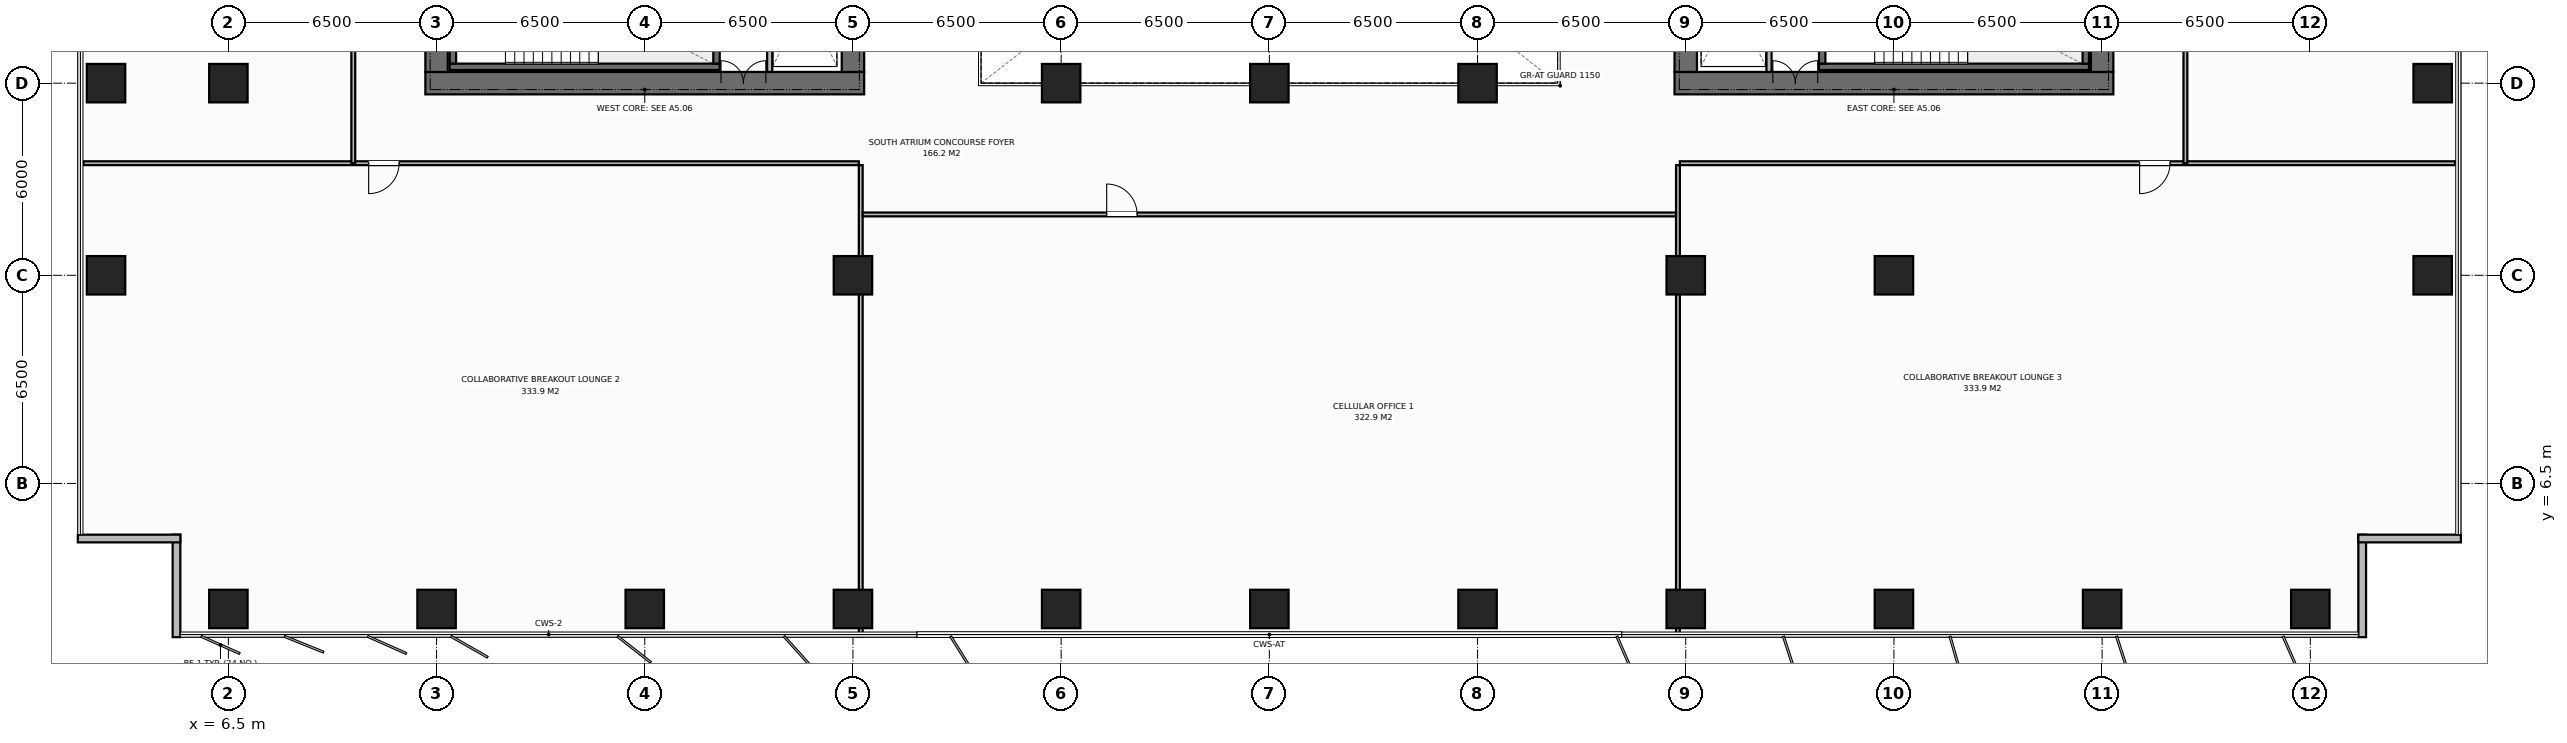
"""IFC4 building model, lengths in metres.
Left out: names, types, materials, properties, quantities, classifications, styles, units other than length and angle.
Written with IfcOpenShell. Run it as: python <this file> out.ifc"""

import sys

from ifc_helpers import new_model, si_unit, direction, frame, frame_2d, origin, origin_2d, place, context, subcontext, project, spatial, rectangle, extrude, element, fill, save


model = new_model("IFC4")
c1 = context("Model", 3, precision=1e-05, world=origin(), true_north=direction((0.0, 1.0)))
c2 = subcontext(c1, "Body", "Model", "MODEL_VIEW")
j1 = project(units=[si_unit("LENGTHUNIT", "METRE"), si_unit("PLANEANGLEUNIT", "RADIAN")], contexts=[c1])
p1 = place(None, origin())
s1 = spatial("IfcSite", under=j1, at=p1, CompositionType="ELEMENT")
p2 = place(p1, origin())
s2 = spatial("IfcBuilding", under=s1, at=p2, CompositionType="ELEMENT")
p3 = place(p2, frame((0.0, 0.0, 89.8)))
s3 = spatial("IfcBuildingStorey", under=s2, at=p3, CompositionType="ELEMENT", Elevation=89.8)
p4 = place(p3, frame((12.65, 19.0, 0.0), z_axis=(0.0, 0.0, 1.0), x_axis=(1.0, 0.0, 0.0)))
e1 = element("IfcWall", 1, at=p4, inside=s3, PredefinedType="SHEAR", context=c2, shape_type="SweptSolid", body=[
    extrude(rectangle(XDim=13.7, YDim=0.7, at=frame_2d((6.85, 0.0))), origin(), (0.0, 0.0, 1.0), 3.8),
])
p5 = place(p4, frame((9.23, 0.0, 0.0)))
e2 = element("IfcOpeningElement", 2, at=p5, cuts=e1, PredefinedType="OPENING", context=c2, shape_type="SweptSolid", body=[
    extrude(rectangle(XDim=1.4, YDim=2.2, at=frame_2d((0.7, 1.1))), frame((0.0, 0.36, 0.0), z_axis=(0.0, -1.0, 0.0), x_axis=(1.0, 0.0, 0.0)), (0.0, 0.0, 1.0), 0.72),
])
p6 = place(p3, frame((13.0, 19.35, 0.0), z_axis=(0.0, 0.0, 1.0), x_axis=(0.0, 1.0, 0.0)))
e3 = element("IfcWall", 3, at=p6, inside=s3, PredefinedType="SHEAR", context=c2, shape_type="SweptSolid", body=[
    extrude(rectangle(XDim=13.3, YDim=0.7, at=frame_2d((6.65, 0.0))), origin(), (0.0, 0.0, 1.0), 3.8),
])
p7 = place(p6, frame((4.7, 0.0, 0.0)))
e4 = element("IfcOpeningElement", 4, at=p7, cuts=e3, PredefinedType="OPENING", context=c2, shape_type="SweptSolid", body=[
    extrude(rectangle(XDim=1.4, YDim=2.2, at=frame_2d((0.7, 1.1))), frame((0.0, 0.36, 0.0), z_axis=(0.0, -1.0, 0.0), x_axis=(1.0, 0.0, 0.0)), (0.0, 0.0, 1.0), 0.72),
])
p8 = place(p3, frame((26.0, 19.35, 0.0), z_axis=(0.0, 0.0, 1.0), x_axis=(0.0, 1.0, 0.0)))
e5 = element("IfcWall", 5, at=p8, inside=s3, PredefinedType="SHEAR", context=c2, shape_type="SweptSolid", body=[
    extrude(rectangle(XDim=13.3, YDim=0.7, at=frame_2d((6.65, 0.0))), origin(), (0.0, 0.0, 1.0), 3.8),
])
p9 = place(p3, frame((51.65, 19.0, 0.0), z_axis=(0.0, 0.0, 1.0), x_axis=(1.0, 0.0, 0.0)))
e6 = element("IfcWall", 6, at=p9, inside=s3, PredefinedType="SHEAR", context=c2, shape_type="SweptSolid", body=[
    extrude(rectangle(XDim=13.7, YDim=0.7, at=frame_2d((6.85, 0.0))), origin(), (0.0, 0.0, 1.0), 3.8),
])
p10 = place(p9, frame((3.07, 0.0, 0.0)))
e7 = element("IfcOpeningElement", 7, at=p10, cuts=e6, PredefinedType="OPENING", context=c2, shape_type="SweptSolid", body=[
    extrude(rectangle(XDim=1.4, YDim=2.2, at=frame_2d((0.7, 1.1))), frame((0.0, 0.36, 0.0), z_axis=(0.0, -1.0, 0.0), x_axis=(1.0, 0.0, 0.0)), (0.0, 0.0, 1.0), 0.72),
])
p11 = place(p3, frame((52.0, 19.35, 0.0), z_axis=(0.0, 0.0, 1.0), x_axis=(0.0, 1.0, 0.0)))
e8 = element("IfcWall", 8, at=p11, inside=s3, PredefinedType="SHEAR", context=c2, shape_type="SweptSolid", body=[
    extrude(rectangle(XDim=13.3, YDim=0.7, at=frame_2d((6.65, 0.0))), origin(), (0.0, 0.0, 1.0), 3.8),
])
p12 = place(p3, frame((65.0, 19.35, 0.0), z_axis=(0.0, 0.0, 1.0), x_axis=(0.0, 1.0, 0.0)))
e9 = element("IfcWall", 9, at=p12, inside=s3, PredefinedType="SHEAR", context=c2, shape_type="SweptSolid", body=[
    extrude(rectangle(XDim=13.3, YDim=0.7, at=frame_2d((6.65, 0.0))), origin(), (0.0, 0.0, 1.0), 3.8),
])
p13 = place(p12, frame((8.1, 0.0, 0.0)))
e10 = element("IfcOpeningElement", 10, at=p13, cuts=e9, PredefinedType="OPENING", context=c2, shape_type="SweptSolid", body=[
    extrude(rectangle(XDim=1.3, YDim=2.2, at=frame_2d((0.65, 1.1))), frame((0.0, 0.36, 0.0), z_axis=(0.0, -1.0, 0.0), x_axis=(1.0, 0.0, 0.0)), (0.0, 0.0, 1.0), 0.72),
])
p14 = place(p3, frame((13.41, 19.51, 0.0), z_axis=(0.0, 0.0, 1.0), x_axis=(1.0, 0.0, 0.0)))
e11 = element("IfcWall", 11, at=p14, inside=s3, PredefinedType="SHEAR", context=c2, shape_type="SweptSolid", body=[
    extrude(rectangle(XDim=8.43, YDim=0.2, at=frame_2d((4.215, 0.0))), origin(), (0.0, 0.0, 1.0), 3.8),
])
for number, where, z_axis, x_axis in (
    (12, (13.51, 19.61, 0.0), (0.0, 0.0, 1.0), (0.0, 1.0, 0.0)),
    (13, (21.74, 19.61, 0.0), (0.0, 0.0, 1.0), (0.0, 1.0, 0.0)),
):
    element("IfcWall", number, at=place(p3, frame(where, z_axis=z_axis, x_axis=x_axis)), inside=s3, PredefinedType="SHEAR", context=c2, shape_type="SweptSolid", body=[
        extrude(rectangle(XDim=3.28, YDim=0.2, at=frame_2d((1.64, 0.0))), origin(), (0.0, 0.0, 1.0), 3.8),
    ])
p15 = place(p3, frame((56.16, 19.51, 0.0), z_axis=(0.0, 0.0, 1.0), x_axis=(1.0, 0.0, 0.0)))
e14 = element("IfcWall", 14, at=p15, inside=s3, PredefinedType="SHEAR", context=c2, shape_type="SweptSolid", body=[
    extrude(rectangle(XDim=8.43, YDim=0.2, at=frame_2d((4.215, 0.0))), origin(), (0.0, 0.0, 1.0), 3.8),
])
for number, where, z_axis, x_axis in (
    (15, (56.26, 19.61, 0.0), (0.0, 0.0, 1.0), (0.0, 1.0, 0.0)),
    (16, (64.49, 19.61, 0.0), (0.0, 0.0, 1.0), (0.0, 1.0, 0.0)),
):
    element("IfcWall", number, at=place(p3, frame(where, z_axis=z_axis, x_axis=x_axis)), inside=s3, PredefinedType="SHEAR", context=c2, shape_type="SweptSolid", body=[
        extrude(rectangle(XDim=3.28, YDim=0.2, at=frame_2d((1.64, 0.0))), origin(), (0.0, 0.0, 1.0), 3.8),
    ])
for number, where, z_axis, x_axis in (
    (17, (58.5, 13.0, 0.0), (0.0, 0.0, 1.0), (1.0, 0.0, 0.0)),
    (18, (6.5, 19.0, 0.0), (0.0, 0.0, 1.0), (1.0, 0.0, 0.0)),
    (19, (32.5, 19.0, 0.0), (0.0, 0.0, 1.0), (1.0, 0.0, 0.0)),
    (20, (39.0, 19.0, 0.0), (0.0, 0.0, 1.0), (1.0, 0.0, 0.0)),
    (21, (45.5, 19.0, 0.0), (0.0, 0.0, 1.0), (1.0, 0.0, 0.0)),
    (22, (26.0, 13.0, 0.0), (0.0, 0.0, 1.0), (1.0, 0.0, 0.0)),
    (23, (52.0, 13.0, 0.0), (0.0, 0.0, 1.0), (1.0, 0.0, 0.0)),
    (24, (6.5, 2.58, 0.0), (0.0, 0.0, 1.0), (1.0, 0.0, 0.0)),
    (25, (13.0, 2.58, 0.0), (0.0, 0.0, 1.0), (1.0, 0.0, 0.0)),
    (26, (19.5, 2.58, 0.0), (0.0, 0.0, 1.0), (1.0, 0.0, 0.0)),
    (27, (26.0, 2.58, 0.0), (0.0, 0.0, 1.0), (1.0, 0.0, 0.0)),
    (28, (32.5, 2.58, 0.0), (0.0, 0.0, 1.0), (1.0, 0.0, 0.0)),
    (29, (39.0, 2.58, 0.0), (0.0, 0.0, 1.0), (1.0, 0.0, 0.0)),
    (30, (45.5, 2.58, 0.0), (0.0, 0.0, 1.0), (1.0, 0.0, 0.0)),
    (31, (52.0, 2.58, 0.0), (0.0, 0.0, 1.0), (1.0, 0.0, 0.0)),
    (32, (58.5, 2.58, 0.0), (0.0, 0.0, 1.0), (1.0, 0.0, 0.0)),
    (33, (65.0, 2.58, 0.0), (0.0, 0.0, 1.0), (1.0, 0.0, 0.0)),
    (34, (71.5, 2.58, 0.0), (0.0, 0.0, 1.0), (1.0, 0.0, 0.0)),
    (35, (2.68, 13.0, 0.0), (0.0, 0.0, 1.0), (1.0, 0.0, 0.0)),
    (36, (75.32, 13.0, 0.0), (0.0, 0.0, 1.0), (1.0, 0.0, 0.0)),
    (37, (2.68, 19.0, 0.0), (0.0, 0.0, 1.0), (1.0, 0.0, 0.0)),
    (38, (75.32, 19.0, 0.0), (0.0, 0.0, 1.0), (1.0, 0.0, 0.0)),
):
    element("IfcColumn", number, at=place(p3, frame(where, z_axis=z_axis, x_axis=x_axis)), inside=s3, PredefinedType="COLUMN", context=c2, shape_type="SweptSolid", body=[
        extrude(rectangle(XDim=1.2, YDim=1.2, at=origin_2d()), origin(), (0.0, 0.0, 1.0), 3.8),
    ])
for number, where, z_axis, x_axis in (
    (39, (4.88, 1.7, 0.0), (0.0, 0.0, 1.0), (0.0, 1.0, 0.0)),
    (40, (5.0, 4.78, 0.0), (0.0, 0.0, 1.0), (-1.0, 0.0, 0.0)),
    (41, (73.12, 4.9, 0.0), (0.0, 0.0, 1.0), (0.0, -1.0, 0.0)),
    (42, (76.2, 4.78, 0.0), (0.0, 0.0, 1.0), (-1.0, 0.0, 0.0)),
):
    element("IfcWall", number, at=place(p3, frame(where, z_axis=z_axis, x_axis=x_axis)), inside=s3, PredefinedType="STANDARD", context=c2, shape_type="SweptSolid", body=[
        extrude(rectangle(XDim=3.2, YDim=0.24, at=frame_2d((1.6, 0.0))), origin(), (0.0, 0.0, 1.0), 3.565),
    ])
p16 = place(p3, frame((23.4, 19.35, 0.0), z_axis=(0.0, 0.0, 1.0), x_axis=(0.0, 1.0, 0.0)))
e43 = element("IfcWall", 43, at=p16, inside=s3, PredefinedType="STANDARD", context=c2, shape_type="SweptSolid", body=[
    extrude(rectangle(XDim=13.3, YDim=0.16, at=frame_2d((6.65, 0.0))), origin(), (0.0, 0.0, 1.0), 3.565),
])
p17 = place(p16, frame((4.95, 0.0, 0.0)))
e44 = element("IfcOpeningElement", 44, at=p17, cuts=e43, PredefinedType="OPENING", context=c2, shape_type="SweptSolid", body=[
    extrude(rectangle(XDim=1.1, YDim=2.2, at=frame_2d((0.55, 1.1))), frame((0.0, 0.09, 0.0), z_axis=(0.0, -1.0, 0.0), x_axis=(1.0, 0.0, 0.0)), (0.0, 0.0, 1.0), 0.18),
])
p18 = place(p16, frame((7.1, 0.0, 0.0)))
e45 = element("IfcOpeningElement", 45, at=p18, cuts=e43, PredefinedType="OPENING", context=c2, shape_type="SweptSolid", body=[
    extrude(rectangle(XDim=1.1, YDim=2.2, at=frame_2d((0.55, 1.1))), frame((0.0, 0.09, 0.0), z_axis=(0.0, -1.0, 0.0), x_axis=(1.0, 0.0, 0.0)), (0.0, 0.0, 1.0), 0.18),
])
p19 = place(p3, frame((54.6, 19.35, 0.0), z_axis=(0.0, 0.0, 1.0), x_axis=(0.0, 1.0, 0.0)))
e46 = element("IfcWall", 46, at=p19, inside=s3, PredefinedType="STANDARD", context=c2, shape_type="SweptSolid", body=[
    extrude(rectangle(XDim=13.3, YDim=0.16, at=frame_2d((6.65, 0.0))), origin(), (0.0, 0.0, 1.0), 3.565),
])
p20 = place(p19, frame((4.95, 0.0, 0.0)))
e47 = element("IfcOpeningElement", 47, at=p20, cuts=e46, PredefinedType="OPENING", context=c2, shape_type="SweptSolid", body=[
    extrude(rectangle(XDim=1.1, YDim=2.2, at=frame_2d((0.55, 1.1))), frame((0.0, 0.09, 0.0), z_axis=(0.0, -1.0, 0.0), x_axis=(1.0, 0.0, 0.0)), (0.0, 0.0, 1.0), 0.18),
])
p21 = place(p19, frame((7.1, 0.0, 0.0)))
e48 = element("IfcOpeningElement", 48, at=p21, cuts=e46, PredefinedType="OPENING", context=c2, shape_type="SweptSolid", body=[
    extrude(rectangle(XDim=1.1, YDim=2.2, at=frame_2d((0.55, 1.1))), frame((0.0, 0.09, 0.0), z_axis=(0.0, -1.0, 0.0), x_axis=(1.0, 0.0, 0.0)), (0.0, 0.0, 1.0), 0.18),
])
p22 = place(p3, frame((26.243, 1.72, 0.0), z_axis=(0.0, 0.0, 1.0), x_axis=(0.0, 1.0, 0.0)))
e49 = element("IfcWall", 49, at=p22, inside=s3, PredefinedType="PARTITIONING", context=c2, shape_type="SweptSolid", body=[
    extrude(rectangle(XDim=14.72, YDim=0.12, at=frame_2d((7.36, 0.0))), origin(), (0.0, 0.0, 1.0), 3.565),
])
p23 = place(p3, frame((1.98, 16.5, 0.0), z_axis=(0.0, 0.0, 1.0), x_axis=(1.0, 0.0, 0.0)))
e50 = element("IfcWall", 50, at=p23, inside=s3, PredefinedType="PARTITIONING", context=c2, shape_type="SweptSolid", body=[
    extrude(rectangle(XDim=24.203, YDim=0.12, at=frame_2d((12.102, 0.0))), origin(), (0.0, 0.0, 1.0), 3.565),
])
p24 = place(p23, frame((8.9, 0.0, 0.0)))
e51 = element("IfcOpeningElement", 51, at=p24, cuts=e50, PredefinedType="OPENING", context=c2, shape_type="SweptSolid", body=[
    extrude(rectangle(XDim=0.95, YDim=2.15, at=frame_2d((0.475, 1.075))), frame((0.0, 0.07, 0.0), z_axis=(0.0, -1.0, 0.0), x_axis=(1.0, 0.0, 0.0)), (0.0, 0.0, 1.0), 0.14),
])
p25 = place(p3, frame((51.757, 1.72, 0.0), z_axis=(0.0, 0.0, 1.0), x_axis=(0.0, 1.0, 0.0)))
e52 = element("IfcWall", 52, at=p25, inside=s3, PredefinedType="PARTITIONING", context=c2, shape_type="SweptSolid", body=[
    extrude(rectangle(XDim=14.72, YDim=0.12, at=frame_2d((7.36, 0.0))), origin(), (0.0, 0.0, 1.0), 3.565),
])
p26 = place(p3, frame((26.303, 14.9, 0.0), z_axis=(0.0, 0.0, 1.0), x_axis=(1.0, 0.0, 0.0)))
e53 = element("IfcWall", 53, at=p26, inside=s3, PredefinedType="PARTITIONING", context=c2, shape_type="SweptSolid", body=[
    extrude(rectangle(XDim=25.394, YDim=0.12, at=frame_2d((12.697, 0.0))), origin(), (0.0, 0.0, 1.0), 3.565),
])
p27 = place(p26, frame((7.618, 0.0, 0.0)))
e54 = element("IfcOpeningElement", 54, at=p27, cuts=e53, PredefinedType="OPENING", context=c2, shape_type="SweptSolid", body=[
    extrude(rectangle(XDim=0.95, YDim=2.15, at=frame_2d((0.475, 1.075))), frame((0.0, 0.07, 0.0), z_axis=(0.0, -1.0, 0.0), x_axis=(1.0, 0.0, 0.0)), (0.0, 0.0, 1.0), 0.14),
])
p28 = place(p3, frame((51.817, 16.5, 0.0), z_axis=(0.0, 0.0, 1.0), x_axis=(1.0, 0.0, 0.0)))
e55 = element("IfcWall", 55, at=p28, inside=s3, PredefinedType="PARTITIONING", context=c2, shape_type="SweptSolid", body=[
    extrude(rectangle(XDim=24.203, YDim=0.12, at=frame_2d((12.102, 0.0))), origin(), (0.0, 0.0, 1.0), 3.565),
])
p29 = place(p28, frame((14.353, 0.0, 0.0)))
e56 = element("IfcOpeningElement", 56, at=p29, cuts=e55, PredefinedType="OPENING", context=c2, shape_type="SweptSolid", body=[
    extrude(rectangle(XDim=0.95, YDim=2.15, at=frame_2d((0.475, 1.075))), frame((0.0, 0.07, 0.0), z_axis=(0.0, -1.0, 0.0), x_axis=(1.0, 0.0, 0.0)), (0.0, 0.0, 1.0), 0.14),
])
p30 = place(p3, frame((10.4, 16.5, 0.0), z_axis=(0.0, 0.0, 1.0), x_axis=(0.0, 1.0, 0.0)))
e57 = element("IfcWall", 57, at=p30, inside=s3, PredefinedType="PARTITIONING", context=c2, shape_type="SweptSolid", body=[
    extrude(rectangle(XDim=6.333, YDim=0.12, at=frame_2d((3.167, 0.0))), origin(), (0.0, 0.0, 1.0), 3.565),
])
p31 = place(p30, frame((3.742, 0.0, 0.0)))
e58 = element("IfcOpeningElement", 58, at=p31, cuts=e57, PredefinedType="OPENING", context=c2, shape_type="SweptSolid", body=[
    extrude(rectangle(XDim=0.95, YDim=2.15, at=frame_2d((0.475, 1.075))), frame((0.0, 0.07, 0.0), z_axis=(0.0, -1.0, 0.0), x_axis=(1.0, 0.0, 0.0)), (0.0, 0.0, 1.0), 0.14),
])
p32 = place(p3, frame((67.6, 16.5, 0.0), z_axis=(0.0, 0.0, 1.0), x_axis=(0.0, 1.0, 0.0)))
e59 = element("IfcWall", 59, at=p32, inside=s3, PredefinedType="PARTITIONING", context=c2, shape_type="SweptSolid", body=[
    extrude(rectangle(XDim=19.0, YDim=0.12, at=frame_2d((9.5, 0.0))), origin(), (0.0, 0.0, 1.0), 3.565),
])
p33 = place(p32, frame((9.025, 0.0, 0.0)))
e60 = element("IfcOpeningElement", 60, at=p33, cuts=e59, PredefinedType="OPENING", context=c2, shape_type="SweptSolid", body=[
    extrude(rectangle(XDim=0.95, YDim=2.15, at=frame_2d((0.475, 1.075))), frame((0.0, 0.07, 0.0), z_axis=(0.0, -1.0, 0.0), x_axis=(1.0, 0.0, 0.0)), (0.0, 0.0, 1.0), 0.14),
])
p34 = place(p5, origin())
e61 = element("IfcDoor", 61, at=p34, inside=s3, OperationType="DOUBLE_DOOR_SINGLE_SWING", PredefinedType="DOOR", context=c2, shape_type="SweptSolid", body=[
    extrude(rectangle(XDim=1.4, YDim=2.2, at=frame_2d((0.7, 1.1))), frame((0.0, 0.125, 0.0), z_axis=(0.0, -1.0, 0.0), x_axis=(1.0, 0.0, 0.0)), (0.0, 0.0, 1.0), 0.05),
])
fill(e2, e61)
p35 = place(p10, origin())
e62 = element("IfcDoor", 62, at=p35, inside=s3, OperationType="DOUBLE_DOOR_SINGLE_SWING", PredefinedType="DOOR", context=c2, shape_type="SweptSolid", body=[
    extrude(rectangle(XDim=1.4, YDim=2.2, at=frame_2d((0.7, 1.1))), frame((0.0, 0.125, 0.0), z_axis=(0.0, -1.0, 0.0), x_axis=(1.0, 0.0, 0.0)), (0.0, 0.0, 1.0), 0.05),
])
fill(e7, e62)
p36 = place(p24, origin())
e63 = element("IfcDoor", 63, at=p36, inside=s3, OperationType="SINGLE_SWING_RIGHT", PredefinedType="DOOR", context=c2, shape_type="SweptSolid", body=[
    extrude(rectangle(XDim=0.95, YDim=2.15, at=frame_2d((0.475, 1.075))), frame((0.0, 0.025, 0.0), z_axis=(0.0, -1.0, 0.0), x_axis=(1.0, 0.0, 0.0)), (0.0, 0.0, 1.0), 0.05),
])
fill(e51, e63)
p37 = place(p27, origin())
e64 = element("IfcDoor", 64, at=p37, inside=s3, OperationType="SINGLE_SWING_LEFT", PredefinedType="DOOR", context=c2, shape_type="SweptSolid", body=[
    extrude(rectangle(XDim=0.95, YDim=2.15, at=frame_2d((0.475, 1.075))), frame((0.0, 0.025, 0.0), z_axis=(0.0, -1.0, 0.0), x_axis=(1.0, 0.0, 0.0)), (0.0, 0.0, 1.0), 0.05),
])
fill(e54, e64)
p38 = place(p29, origin())
e65 = element("IfcDoor", 65, at=p38, inside=s3, OperationType="SINGLE_SWING_RIGHT", PredefinedType="DOOR", context=c2, shape_type="SweptSolid", body=[
    extrude(rectangle(XDim=0.95, YDim=2.15, at=frame_2d((0.475, 1.075))), frame((0.0, 0.025, 0.0), z_axis=(0.0, -1.0, 0.0), x_axis=(1.0, 0.0, 0.0)), (0.0, 0.0, 1.0), 0.05),
])
fill(e56, e65)
save(model, sys.argv[1])
